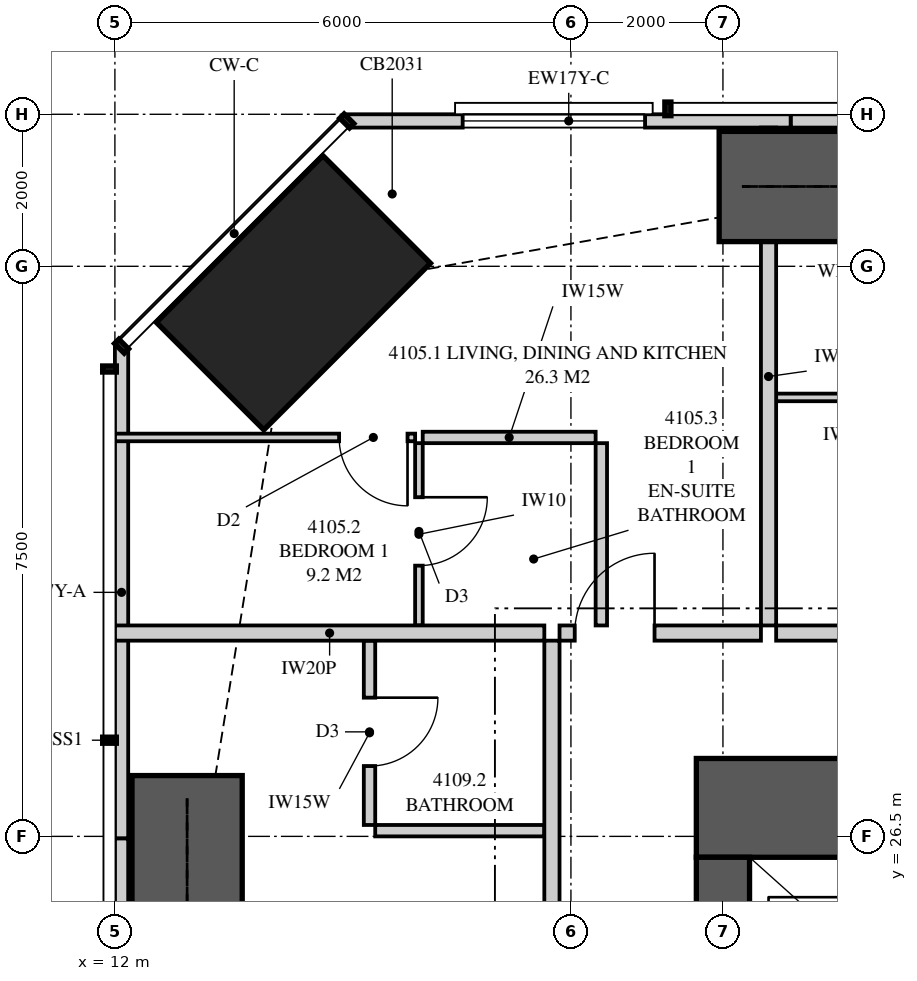
"""IFC4 building model, lengths in metres.
Left out: names, types, materials, properties, quantities, classifications, styles, units other than length and angle.
Written with IfcOpenShell. Run it as: python <this file> out.ifc"""

import sys

from ifc_helpers import new_model, si_unit, direction, frame, frame_2d, origin, origin_2d, place, context, subcontext, project, spatial, polyline, rectangle, hollow_rectangle, outline, extrude, element, fill, save


model = new_model("IFC4")
c1 = context("Model", 3, precision=1e-05, world=origin(), true_north=direction((0.0, 1.0)))
c2 = subcontext(c1, "Body", "Model", "MODEL_VIEW")
j1 = project(units=[si_unit("LENGTHUNIT", "METRE"), si_unit("PLANEANGLEUNIT", "RADIAN")], contexts=[c1])
p1 = place(None, origin())
s1 = spatial("IfcSite", under=j1, at=p1, CompositionType="ELEMENT")
p2 = place(p1, origin())
s2 = spatial("IfcBuilding", under=s1, at=p2, CompositionType="ELEMENT")
p3 = place(p2, frame((0.0, 0.0, 154.35)))
s3 = spatial("IfcBuildingStorey", under=s2, at=p3, CompositionType="ELEMENT", Elevation=154.35)
p4 = place(p3, frame((14.348, 33.652, 0.0), z_axis=(0.0, 0.0, 1.0), x_axis=(0.707106781187, -0.707106781187, 0.0)))
e1 = element("IfcColumn", 1, at=p4, inside=s3, PredefinedType="COLUMN", context=c2, shape_type="SweptSolid", body=[
    extrude(hollow_rectangle(XDim=2.0, YDim=3.1, WallThickness=0.125, at=origin_2d()), origin(), (0.0, 0.0, 1.0), 3.35),
])
p5 = place(p3, frame((26.0, 26.875, 0.0), z_axis=(0.0, 0.0, 1.0), x_axis=(-1.0, 0.0, 0.0)))
e2 = element("IfcWall", 2, at=p5, inside=s3, PredefinedType="SHEAR", context=c2, shape_type="SweptSolid", body=[
    extrude(rectangle(XDim=6.35, YDim=1.3, at=frame_2d((3.175, 0.0))), origin(), (0.0, 0.0, 1.0), 3.35),
])
p6 = place(p5, frame((0.825, 0.0, 0.0)))
e3 = element("IfcOpeningElement", 3, at=p6, cuts=e2, PredefinedType="OPENING", context=c2, shape_type="SweptSolid", body=[
    extrude(rectangle(XDim=0.75, YDim=2.1, at=frame_2d((0.375, 1.05))), frame((0.0, 0.66, 0.0), z_axis=(0.0, -1.0, 0.0), x_axis=(1.0, 0.0, 0.0)), (0.0, 0.0, 1.0), 1.32),
])
p7 = place(p3, frame((20.0, 26.225, 0.0), z_axis=(0.0, 0.0, 1.0), x_axis=(0.0, -1.0, 0.0)))
e4 = element("IfcWall", 4, at=p7, inside=s3, PredefinedType="SHEAR", context=c2, shape_type="SweptSolid", body=[
    extrude(rectangle(XDim=2.925, YDim=0.7, at=frame_2d((1.462, 0.0))), origin(), (0.0, 0.0, 1.0), 3.35),
])
p8 = place(p3, frame((44.109, 35.913, 0.0), z_axis=(0.0, 0.0, 1.0), x_axis=(-1.0, 0.0, 0.0)))
e5 = element("IfcWall", 5, at=p8, inside=s3, PredefinedType="SOLIDWALL", context=c2, shape_type="SweptSolid", body=[
    extrude(outline(polyline([(23.218, 2.15), (0.0, 2.15), (0.0, 0.0), (1.343, 0.0), (1.343, 0.158), (1.624, 0.302), (1.697, 0.302), (1.85, 0.0), (11.636, 0.0), (11.636, 0.178), (11.908, 0.331), (11.964, 0.331), (12.149, 0.0), (21.925, 0.0), (21.925, 0.201), (22.181, 0.358), (22.224, 0.358), (22.444, 0.0), (23.218, 0.0), (23.218, 2.15)])), frame((0.0, 0.087, 0.0), z_axis=(0.0, -1.0, 0.0), x_axis=(1.0, 0.0, 0.0)), (0.0, 0.0, 1.0), 0.175),
])
p9 = place(p8, frame((4.459, 0.0, 0.0)))
e6 = element("IfcOpeningElement", 6, at=p9, cuts=e5, PredefinedType="OPENING", context=c2, shape_type="SweptSolid", body=[
    extrude(rectangle(XDim=1.8, YDim=2.1, at=frame_2d((0.9, 1.05))), frame((0.0, 0.097, 0.0), z_axis=(0.0, -1.0, 0.0), x_axis=(1.0, 0.0, 0.0)), (0.0, 0.0, 1.0), 0.195),
])
p10 = place(p8, frame((6.809, 0.0, 0.4)))
e7 = element("IfcOpeningElement", 7, at=p10, cuts=e5, PredefinedType="OPENING", context=c2, shape_type="SweptSolid", body=[
    extrude(rectangle(XDim=2.4, YDim=1.7, at=frame_2d((1.2, 0.85))), frame((0.0, 0.097, 0.0), z_axis=(0.0, -1.0, 0.0), x_axis=(1.0, 0.0, 0.0)), (0.0, 0.0, 1.0), 0.195),
])
p11 = place(p8, frame((16.859, 0.0, 0.0)))
e8 = element("IfcOpeningElement", 8, at=p11, cuts=e5, PredefinedType="OPENING", context=c2, shape_type="SweptSolid", body=[
    extrude(rectangle(XDim=1.8, YDim=2.1, at=frame_2d((0.9, 1.05))), frame((0.0, 0.097, 0.0), z_axis=(0.0, -1.0, 0.0), x_axis=(1.0, 0.0, 0.0)), (0.0, 0.0, 1.0), 0.195),
])
p12 = place(p8, frame((14.009, 0.0, 0.4)))
e9 = element("IfcOpeningElement", 9, at=p12, cuts=e5, PredefinedType="OPENING", context=c2, shape_type="SweptSolid", body=[
    extrude(rectangle(XDim=2.4, YDim=1.7, at=frame_2d((1.2, 0.85))), frame((0.0, 0.097, 0.0), z_axis=(0.0, -1.0, 0.0), x_axis=(1.0, 0.0, 0.0)), (0.0, 0.0, 1.0), 0.195),
])
p13 = place(p3, frame((20.891, 35.913, 0.0), z_axis=(0.0, 0.0, 1.0), x_axis=(-1.0, 0.0, 0.0)))
e10 = element("IfcWall", 10, at=p13, inside=s3, PredefinedType="SOLIDWALL", context=c2, shape_type="SweptSolid", body=[
    extrude(rectangle(XDim=5.84, YDim=0.175, at=frame_2d((2.92, 0.0))), origin(), (0.0, 0.0, 1.0), 3.11),
])
p14 = place(p13, frame((1.915, 0.0, 0.4)))
e11 = element("IfcOpeningElement", 11, at=p14, cuts=e10, PredefinedType="OPENING", context=c2, shape_type="SweptSolid", body=[
    extrude(rectangle(XDim=2.4, YDim=1.7, at=frame_2d((1.2, 0.85))), frame((0.0, 0.097, 0.0), z_axis=(0.0, -1.0, 0.0), x_axis=(1.0, 0.0, 0.0)), (0.0, 0.0, 1.0), 0.195),
])
p15 = place(p3, frame((12.087, 32.949, 0.0), z_axis=(0.0, 0.0, 1.0), x_axis=(0.0, -1.0, 0.0)))
e12 = element("IfcWall", 12, at=p15, inside=s3, PredefinedType="SOLIDWALL", context=c2, shape_type="SweptSolid", body=[
    extrude(rectangle(XDim=6.477, YDim=0.175, at=frame_2d((3.238, 0.0))), origin(), (0.0, 0.0, 1.0), 3.11),
])
p16 = place(p3, frame((12.087, 26.472, 0.0), z_axis=(0.0, 0.0, 1.0), x_axis=(0.0, -1.0, 0.0)))
e13 = element("IfcWall", 13, at=p16, inside=s3, PredefinedType="SOLIDWALL", context=c2, shape_type="SweptSolid", body=[
    extrude(outline(polyline([(15.251, 2.15), (0.0, 2.15), (0.0, 0.0), (0.762, 0.0), (0.762, 0.079), (2.182, 0.079), (2.182, 0.0), (12.762, 0.0), (12.762, 0.079), (14.182, 0.079), (14.182, 0.0), (15.251, 0.0), (15.251, 2.15)])), frame((0.0, 0.087, 0.0), z_axis=(0.0, -1.0, 0.0), x_axis=(1.0, 0.0, 0.0)), (0.0, 0.0, 1.0), 0.175),
])
p17 = place(p16, frame((3.89, 0.0, 0.4)))
e14 = element("IfcOpeningElement", 14, at=p17, cuts=e13, PredefinedType="OPENING", context=c2, shape_type="SweptSolid", body=[
    extrude(rectangle(XDim=1.2, YDim=1.7, at=frame_2d((0.6, 0.85))), frame((0.0, 0.097, 0.0), z_axis=(0.0, -1.0, 0.0), x_axis=(1.0, 0.0, 0.0)), (0.0, 0.0, 1.0), 0.195),
])
p18 = place(p16, frame((8.606, 0.0, 0.4)))
e15 = element("IfcOpeningElement", 15, at=p18, cuts=e13, PredefinedType="OPENING", context=c2, shape_type="SweptSolid", body=[
    extrude(rectangle(XDim=2.4, YDim=1.7, at=frame_2d((1.2, 0.85))), frame((0.0, 0.097, 0.0), z_axis=(0.0, -1.0, 0.0), x_axis=(1.0, 0.0, 0.0)), (0.0, 0.0, 1.0), 0.195),
])
p19 = place(p3, frame((20.6, 35.825, 0.0), z_axis=(0.0, 0.0, 1.0), x_axis=(0.0, -1.0, 0.0)))
e16 = element("IfcWall", 16, at=p19, inside=s3, PredefinedType="PARTITIONING", context=c2, shape_type="SweptSolid", body=[
    extrude(outline(polyline([(0.529, 2.15), (0.0, 2.15), (0.0, 0.0), (0.529, 0.0), (0.529, 0.038), (1.021, 0.038), (1.021, 0.0), (6.55, 0.0), (6.55, 3.11), (2.194, 3.11), (2.194, 2.15), (1.021, 2.15), (1.021, 1.961), (0.529, 1.961), (0.529, 2.15)])), frame((0.0, 0.1, 0.0), z_axis=(0.0, -1.0, 0.0), x_axis=(1.0, 0.0, 0.0)), (0.0, 0.0, 1.0), 0.2),
])
p20 = place(p3, frame((17.85, 29.175, 0.0), z_axis=(0.0, 0.0, 1.0), x_axis=(1.0, 0.0, 0.0)))
e17 = element("IfcWall", 17, at=p20, inside=s3, PredefinedType="PARTITIONING", context=c2, shape_type="SweptSolid", body=[
    extrude(rectangle(XDim=2.65, YDim=0.2, at=frame_2d((1.325, 0.0))), origin(), (0.0, 0.0, 1.0), 3.11),
])
p21 = place(p20, frame((0.2, 0.0, 0.0)))
e18 = element("IfcOpeningElement", 18, at=p21, cuts=e17, PredefinedType="OPENING", context=c2, shape_type="SweptSolid", body=[
    extrude(rectangle(XDim=1.05, YDim=2.2, at=frame_2d((0.525, 1.1))), frame((0.0, 0.11, 0.0), z_axis=(0.0, -1.0, 0.0), x_axis=(1.0, 0.0, 0.0)), (0.0, 0.0, 1.0), 0.22),
])
p22 = place(p3, frame((16.0, 31.673, 0.0), z_axis=(0.0, 0.0, 1.0), x_axis=(0.0, -1.0, 0.0)))
e19 = element("IfcWall", 19, at=p22, inside=s3, PredefinedType="PARTITIONING", context=c2, shape_type="SweptSolid", body=[
    extrude(rectangle(XDim=2.398, YDim=0.1, at=frame_2d((1.199, 0.0))), origin(), (0.0, 0.0, 1.0), 3.11),
])
p23 = place(p22, frame((0.712, 0.0, 0.0)))
e20 = element("IfcOpeningElement", 20, at=p23, cuts=e19, PredefinedType="OPENING", context=c2, shape_type="SweptSolid", body=[
    extrude(rectangle(XDim=0.9, YDim=2.1, at=frame_2d((0.45, 1.05))), frame((0.0, 0.06, 0.0), z_axis=(0.0, -1.0, 0.0), x_axis=(1.0, 0.0, 0.0)), (0.0, 0.0, 1.0), 0.12),
])
p24 = place(p3, frame((15.95, 31.748, 0.0), z_axis=(0.0, 0.0, 1.0), x_axis=(-1.0, 0.0, 0.0)))
e21 = element("IfcWall", 21, at=p24, inside=s3, PredefinedType="PARTITIONING", context=c2, shape_type="SweptSolid", body=[
    extrude(outline(polyline([(0.835, 3.11), (0.0, 3.11), (0.0, 0.0), (3.95, 0.0), (3.95, 3.11), (2.983, 3.11), (2.983, 2.15), (0.835, 2.15), (0.835, 3.11)]), holes=[polyline([(2.025, 1.02), (2.122, 1.075), (2.256, 0.739), (2.251, 0.736), (2.025, 1.02)])]), frame((0.0, 0.05, 0.0), z_axis=(0.0, -1.0, 0.0), x_axis=(1.0, 0.0, 0.0)), (0.0, 0.0, 1.0), 0.1),
])
p25 = place(p24, frame((0.1, 0.0, 0.0)))
e22 = element("IfcOpeningElement", 22, at=p25, cuts=e21, PredefinedType="OPENING", context=c2, shape_type="SweptSolid", body=[
    extrude(rectangle(XDim=0.9, YDim=2.1, at=frame_2d((0.45, 1.05))), frame((0.0, 0.06, 0.0), z_axis=(0.0, -1.0, 0.0), x_axis=(1.0, 0.0, 0.0)), (0.0, 0.0, 1.0), 0.12),
])
p26 = place(p3, frame((18.325, 31.748, 0.0), z_axis=(0.0, 0.0, 1.0), x_axis=(-1.0, 0.0, 0.0)))
e23 = element("IfcWall", 23, at=p26, inside=s3, PredefinedType="PLUMBINGWALL", context=c2, shape_type="SweptSolid", body=[
    extrude(rectangle(XDim=2.275, YDim=0.15, at=frame_2d((1.137, 0.0))), origin(), (0.0, 0.0, 1.0), 3.11),
])
p27 = place(p3, frame((18.4, 31.673, 0.0), z_axis=(0.0, 0.0, 1.0), x_axis=(0.0, -1.0, 0.0)))
e24 = element("IfcWall", 24, at=p27, inside=s3, PredefinedType="PLUMBINGWALL", context=c2, shape_type="SweptSolid", body=[
    extrude(rectangle(XDim=2.398, YDim=0.15, at=frame_2d((1.199, 0.0))), origin(), (0.0, 0.0, 1.0), 3.11),
])
p28 = place(p3, frame((20.7, 29.175, 0.0), z_axis=(0.0, 0.0, 1.0), x_axis=(1.0, 0.0, 0.0)))
e25 = element("IfcWall", 25, at=p28, inside=s3, PredefinedType="PARTITIONING", context=c2, shape_type="SweptSolid", body=[
    extrude(outline(polyline([(0.0, 0.0), (5.3, 0.0), (5.3, 3.11), (1.896, 3.11), (1.896, 2.531), (1.204, 2.531), (1.204, 3.11), (0.0, 3.11), (0.0, 0.0)])), frame((0.0, 0.1, 0.0), z_axis=(0.0, -1.0, 0.0), x_axis=(1.0, 0.0, 0.0)), (0.0, 0.0, 1.0), 0.2),
])
p29 = place(p3, frame((20.7, 32.275, 0.0), z_axis=(0.0, 0.0, 1.0), x_axis=(1.0, 0.0, 0.0)))
e26 = element("IfcWall", 26, at=p29, inside=s3, PredefinedType="PARTITIONING", context=c2, shape_type="SweptSolid", body=[
    extrude(outline(polyline([(0.0, 0.0), (3.55, 0.0), (3.55, 3.11), (1.846, 3.11), (1.846, 2.531), (1.254, 2.531), (1.254, 3.11), (0.0, 3.11), (0.0, 0.0)])), frame((0.0, 0.05, 0.0), z_axis=(0.0, -1.0, 0.0), x_axis=(1.0, 0.0, 0.0)), (0.0, 0.0, 1.0), 0.1),
])
p30 = place(p29, frame((1.35, 0.0, 0.0)))
e27 = element("IfcOpeningElement", 27, at=p30, cuts=e26, PredefinedType="OPENING", context=c2, shape_type="SweptSolid", body=[
    extrude(rectangle(XDim=0.9, YDim=2.1, at=frame_2d((0.45, 1.05))), frame((0.0, 0.06, 0.0), z_axis=(0.0, -1.0, 0.0), x_axis=(1.0, 0.0, 0.0)), (0.0, 0.0, 1.0), 0.12),
])
p31 = place(p3, frame((12.0, 29.175, 0.0), z_axis=(0.0, 0.0, 1.0), x_axis=(1.0, 0.0, 0.0)))
e28 = element("IfcWall", 28, at=p31, inside=s3, PredefinedType="PARTITIONING", context=c2, shape_type="SweptSolid", body=[
    extrude(outline(polyline([(0.0, 0.0), (5.65, 0.0), (5.65, 3.11), (2.749, 3.11), (2.749, 2.15), (0.5, 2.15), (0.5, 3.11), (0.0, 3.11), (0.0, 0.0)])), frame((0.0, 0.1, 0.0), z_axis=(0.0, -1.0, 0.0), x_axis=(1.0, 0.0, 0.0)), (0.0, 0.0, 1.0), 0.2),
])
p32 = place(p3, frame((15.35, 26.65, 0.0), z_axis=(0.0, 0.0, 1.0), x_axis=(0.0, 1.0, 0.0)))
e29 = element("IfcWall", 29, at=p32, inside=s3, PredefinedType="PLUMBINGWALL", context=c2, shape_type="SweptSolid", body=[
    extrude(rectangle(XDim=2.425, YDim=0.15, at=frame_2d((1.212, 0.0))), origin(), (0.0, 0.0, 1.0), 3.11),
])
p33 = place(p32, frame((0.775, 0.0, 0.0)))
e30 = element("IfcOpeningElement", 30, at=p33, cuts=e29, PredefinedType="OPENING", context=c2, shape_type="SweptSolid", body=[
    extrude(rectangle(XDim=0.9, YDim=2.1, at=frame_2d((0.45, 1.05))), frame((0.0, 0.085, 0.0), z_axis=(0.0, -1.0, 0.0), x_axis=(1.0, 0.0, 0.0)), (0.0, 0.0, 1.0), 0.17),
])
p34 = place(p3, frame((15.425, 26.575, 0.0), z_axis=(0.0, 0.0, 1.0), x_axis=(1.0, 0.0, 0.0)))
e31 = element("IfcWall", 31, at=p34, inside=s3, PredefinedType="PLUMBINGWALL", context=c2, shape_type="SweptSolid", body=[
    extrude(rectangle(XDim=2.225, YDim=0.15, at=frame_2d((1.112, 0.0))), origin(), (0.0, 0.0, 1.0), 3.11),
])
p35 = place(p3, frame((17.75, 24.6, 0.0), z_axis=(0.0, 0.0, 1.0), x_axis=(0.0, 1.0, 0.0)))
e32 = element("IfcWall", 32, at=p35, inside=s3, PredefinedType="PARTITIONING", context=c2, shape_type="SweptSolid", body=[
    extrude(outline(polyline([(0.0, 0.0), (4.475, 0.0), (4.475, 3.11), (0.746, 3.11), (0.746, 2.531), (0.054, 2.531), (0.054, 3.11), (0.0, 3.11), (0.0, 0.0)])), frame((0.0, 0.1, 0.0), z_axis=(0.0, -1.0, 0.0), x_axis=(1.0, 0.0, 0.0)), (0.0, 0.0, 1.0), 0.2),
])
for number, where, z_axis, x_axis in (
    (33, (19.95, 35.05, 0.0), (0.0, 0.0, 1.0), (1.0, 0.0, 0.0)),
    (34, (12.95, 22.7, 0.0), (0.0, 0.0, 1.0), (0.0, 1.0, 0.0)),
):
    element("IfcWall", number, at=place(p3, frame(where, z_axis=z_axis, x_axis=x_axis)), inside=s3, PredefinedType="SHEAR", context=c2, shape_type="SweptSolid", body=[
        extrude(rectangle(XDim=4.6, YDim=1.45, at=frame_2d((2.3, 0.0))), origin(), (0.0, 0.0, 1.0), 3.35),
    ])
p36 = place(p14, origin())
e35 = element("IfcWindow", 35, at=p36, inside=s3, PartitioningType="SINGLE_PANEL", PredefinedType="WINDOW", context=c2, shape_type="SweptSolid", body=[
    extrude(rectangle(XDim=2.4, YDim=1.7, at=frame_2d((1.2, 0.85))), frame((0.0, 0.03, 0.0), z_axis=(0.0, -1.0, 0.0), x_axis=(1.0, 0.0, 0.0)), (0.0, 0.0, 1.0), 0.06),
])
fill(e11, e35)
p37 = place(p21, origin())
e36 = element("IfcDoor", 36, at=p37, inside=s3, OperationType="SINGLE_SWING_RIGHT", PredefinedType="DOOR", context=c2, shape_type="SweptSolid", body=[
    extrude(rectangle(XDim=1.05, YDim=2.2, at=frame_2d((0.525, 1.1))), frame((0.0, 0.025, 0.0), z_axis=(0.0, -1.0, 0.0), x_axis=(1.0, 0.0, 0.0)), (0.0, 0.0, 1.0), 0.05),
])
fill(e18, e36)
p38 = place(p25, origin())
e37 = element("IfcDoor", 37, at=p38, inside=s3, OperationType="SINGLE_SWING_LEFT", PredefinedType="DOOR", context=c2, shape_type="SweptSolid", body=[
    extrude(rectangle(XDim=0.9, YDim=2.1, at=frame_2d((0.45, 1.05))), frame((0.0, 0.025, 0.0), z_axis=(0.0, -1.0, 0.0), x_axis=(1.0, 0.0, 0.0)), (0.0, 0.0, 1.0), 0.05),
])
fill(e22, e37)
p39 = place(p23, origin())
e38 = element("IfcDoor", 38, at=p39, inside=s3, OperationType="SINGLE_SWING_LEFT", PredefinedType="DOOR", context=c2, shape_type="SweptSolid", body=[
    extrude(rectangle(XDim=0.9, YDim=2.1, at=frame_2d((0.45, 1.05))), frame((0.0, 0.025, 0.0), z_axis=(0.0, -1.0, 0.0), x_axis=(1.0, 0.0, 0.0)), (0.0, 0.0, 1.0), 0.05),
])
fill(e20, e38)
p40 = place(p33, frame((0.9, 0.0, 0.0), z_axis=(0.0, 0.0, 1.0), x_axis=(-1.0, 0.0, 0.0)))
e39 = element("IfcDoor", 39, at=p40, inside=s3, OperationType="SINGLE_SWING_LEFT", PredefinedType="DOOR", context=c2, shape_type="SweptSolid", body=[
    extrude(rectangle(XDim=0.9, YDim=2.1, at=frame_2d((0.45, 1.05))), frame((0.0, 0.025, 0.0), z_axis=(0.0, -1.0, 0.0), x_axis=(1.0, 0.0, 0.0)), (0.0, 0.0, 1.0), 0.05),
])
fill(e30, e39)
save(model, sys.argv[1])
